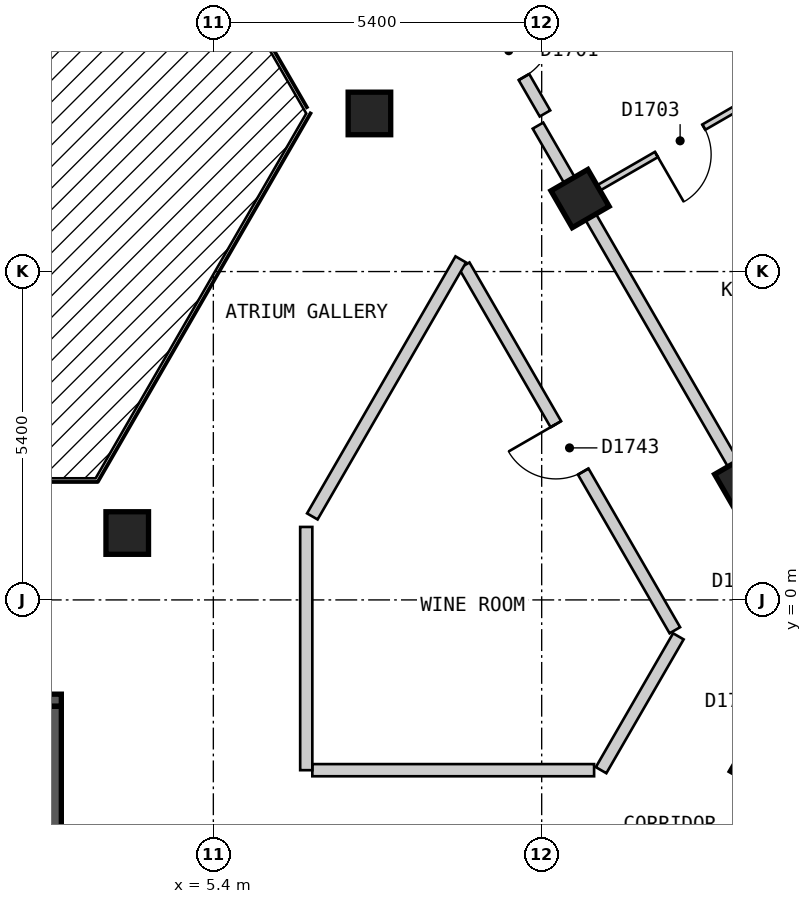
"""IFC4 building model, lengths in metres.
Left out: names, types, materials, properties, quantities, classifications, styles, units other than length and angle.
Written with IfcOpenShell. Run it as: python <this file> out.ifc"""

import sys

from ifc_helpers import new_model, si_unit, direction, frame, frame_2d, origin, origin_2d, place, context, subcontext, project, spatial, rectangle, extrude, element, fill, save


model = new_model("IFC4")
c1 = context("Model", 3, precision=1e-05, world=origin(), true_north=direction((0.0, 1.0)))
c2 = subcontext(c1, "Body", "Model", "MODEL_VIEW")
j1 = project(units=[si_unit("LENGTHUNIT", "METRE"), si_unit("PLANEANGLEUNIT", "RADIAN")], contexts=[c1])
p1 = place(None, origin())
s1 = spatial("IfcSite", under=j1, at=p1, CompositionType="ELEMENT")
p2 = place(p1, origin())
s2 = spatial("IfcBuilding", under=s1, at=p2, CompositionType="ELEMENT")
p3 = place(p2, frame((0.0, 0.0, 181.2)))
s3 = spatial("IfcBuildingStorey", under=s2, at=p3, CompositionType="ELEMENT", Elevation=181.2)
for number, where, z_axis, x_axis in (
    (1, (14.382, -2.689, 0.0), (0.0, 0.0, 1.0), (0.5, 0.866, 0.0)),
    (2, (14.123, 1.937, 0.0), (0.0, 0.0, 1.0), (-0.5, 0.866, 0.0)),
    (3, (3.984, 1.1, 0.0), (0.0, 0.0, 1.0), (1.0, 0.0, 0.0)),
    (4, (11.431, 6.6, 0.0), (0.0, 0.0, 1.0), (-0.5, 0.866, 0.0)),
    (5, (7.967, 8.0, 0.0), (0.0, 0.0, 1.0), (1.0, 0.0, 0.0)),
):
    element("IfcColumn", number, at=place(p3, frame(where, z_axis=z_axis, x_axis=x_axis)), inside=s3, PredefinedType="COLUMN", context=c2, shape_type="SweptSolid", body=[
        extrude(rectangle(XDim=0.7, YDim=0.7, at=origin_2d()), origin(), (0.0, 0.0, 1.0), 3.0),
    ])
p4 = place(p3, frame((-2.9, -1.65, 0.0), z_axis=(0.0, 0.0, 1.0), x_axis=(1.0, 0.0, 0.0)))
e6 = element("IfcWall", 6, at=p4, inside=s3, PredefinedType="SOLIDWALL", context=c2, shape_type="SweptSolid", body=[
    extrude(rectangle(XDim=5.8, YDim=0.2, at=frame_2d((2.9, 0.0))), origin(), (0.0, 0.0, 1.0), 2.7),
])
p5 = place(p4, frame((0.3, 0.0, 0.0)))
e7 = element("IfcOpeningElement", 7, at=p5, cuts=e6, PredefinedType="OPENING", context=c2, shape_type="SweptSolid", body=[
    extrude(rectangle(XDim=1.2, YDim=2.1, at=frame_2d((0.6, 1.05))), frame((0.0, 0.11, 0.0), z_axis=(0.0, -1.0, 0.0), x_axis=(1.0, 0.0, 0.0)), (0.0, 0.0, 1.0), 0.22),
])
p6 = place(p3, frame((2.8, -4.5, 0.0), z_axis=(0.0, 0.0, 1.0), x_axis=(0.0, 1.0, 0.0)))
e8 = element("IfcWall", 8, at=p6, inside=s3, PredefinedType="SOLIDWALL", context=c2, shape_type="SweptSolid", body=[
    extrude(rectangle(XDim=2.75, YDim=0.2, at=frame_2d((1.375, 0.0))), origin(), (0.0, 0.0, 1.0), 2.7),
])
p7 = place(p3, frame((9.526, 5.5, 0.0), z_axis=(0.0, 0.0, 1.0), x_axis=(0.500062092869, -0.865989551482, 0.0)))
e9 = element("IfcWall", 9, at=p7, inside=s3, PredefinedType="PARTITIONING", context=c2, shape_type="SweptSolid", body=[
    extrude(rectangle(XDim=6.927, YDim=0.2, at=frame_2d((3.464, 0.0))), origin(), (0.0, 0.0, 1.0), 2.7),
])
p8 = place(p7, frame((3.014, 0.0, 0.0)))
e10 = element("IfcOpeningElement", 10, at=p8, cuts=e9, PredefinedType="OPENING", context=c2, shape_type="SweptSolid", body=[
    extrude(rectangle(XDim=0.9, YDim=2.1, at=frame_2d((0.45, 1.05))), frame((0.0, 0.11, 0.0), z_axis=(0.0, -1.0, 0.0), x_axis=(1.0, 0.0, 0.0)), (0.0, 0.0, 1.0), 0.22),
])
p9 = place(p3, frame((10.739, 7.8, 0.0), z_axis=(0.0, 0.0, 1.0), x_axis=(0.500023726918, -0.866011704609, 0.0)))
e11 = element("IfcWall", 11, at=p9, inside=s3, PredefinedType="PARTITIONING", context=c2, shape_type="SweptSolid", body=[
    extrude(rectangle(XDim=9.47, YDim=0.2, at=frame_2d((4.735, 0.0))), origin(), (0.0, 0.0, 1.0), 2.7),
])
p10 = place(p9, frame((8.168, 0.0, 0.0)))
e12 = element("IfcOpeningElement", 12, at=p10, cuts=e11, PredefinedType="OPENING", context=c2, shape_type="SweptSolid", body=[
    extrude(rectangle(XDim=1.0, YDim=2.1, at=frame_2d((0.5, 1.05))), frame((0.0, 0.11, 0.0), z_axis=(0.0, -1.0, 0.0), x_axis=(1.0, 0.0, 0.0)), (0.0, 0.0, 1.0), 0.22),
])
p11 = place(p3, frame((5.485, 17.3, 0.0), z_axis=(0.0, 0.0, 1.0), x_axis=(0.499965832213, -0.866045129667, 0.0)))
e13 = element("IfcWall", 13, at=p11, inside=s3, PredefinedType="PARTITIONING", context=c2, shape_type="SweptSolid", body=[
    extrude(rectangle(XDim=10.739, YDim=0.2, at=frame_2d((5.369, 0.0))), origin(), (0.0, 0.0, 1.0), 2.7),
])
p12 = place(p11, frame((9.047, 0.0, 0.0)))
e14 = element("IfcOpeningElement", 14, at=p12, cuts=e13, PredefinedType="OPENING", context=c2, shape_type="SweptSolid", body=[
    extrude(rectangle(XDim=1.0, YDim=2.1, at=frame_2d((0.5, 1.05))), frame((0.0, 0.11, 0.0), z_axis=(0.0, -1.0, 0.0), x_axis=(1.0, 0.0, 0.0)), (0.0, 0.0, 1.0), 0.22),
])
p13 = place(p3, frame((7.028, -2.8, 0.0), z_axis=(0.0, 0.0, 1.0), x_axis=(1.0, 0.0, 0.0)))
e15 = element("IfcWall", 15, at=p13, inside=s3, PredefinedType="PARTITIONING", context=c2, shape_type="SweptSolid", body=[
    extrude(rectangle(XDim=4.634, YDim=0.2, at=frame_2d((2.317, 0.0))), origin(), (0.0, 0.0, 1.0), 2.7),
])
p14 = place(p3, frame((7.028, 1.373, 0.0), z_axis=(0.0, 0.0, 1.0), x_axis=(0.500065924398, 0.86598733897, 0.0)))
e16 = element("IfcWall", 16, at=p14, inside=s3, PredefinedType="PARTITIONING", context=c2, shape_type="SweptSolid", body=[
    extrude(rectangle(XDim=4.881, YDim=0.2, at=frame_2d((2.44, 0.0))), origin(), (0.0, 0.0, 1.0), 2.7),
])
p15 = place(p3, frame((11.777, -2.8, 0.0), z_axis=(0.0, 0.0, 1.0), x_axis=(0.500085537782, 0.86597601289, 0.0)))
e17 = element("IfcWall", 17, at=p15, inside=s3, PredefinedType="PARTITIONING", context=c2, shape_type="SweptSolid", body=[
    extrude(rectangle(XDim=2.542, YDim=0.2, at=frame_2d((1.271, 0.0))), origin(), (0.0, 0.0, 1.0), 2.7),
])
p16 = place(p3, frame((6.928, -2.8, 0.0), z_axis=(0.0, 0.0, 1.0), x_axis=(0.0, 1.0, 0.0)))
e18 = element("IfcWall", 18, at=p16, inside=s3, PredefinedType="PARTITIONING", context=c2, shape_type="SweptSolid", body=[
    extrude(rectangle(XDim=4.0, YDim=0.2, at=frame_2d((2.0, 0.0))), origin(), (0.0, 0.0, 1.0), 2.7),
])
p17 = place(p3, frame((9.526, 17.5, 0.0), z_axis=(0.0, 0.0, 1.0), x_axis=(0.500019134094, -0.866014356428, 0.0)))
e19 = element("IfcWall", 19, at=p17, inside=s3, PredefinedType="PARTITIONING", context=c2, shape_type="SweptSolid", body=[
    extrude(rectangle(XDim=10.97, YDim=0.1, at=frame_2d((5.485, 0.0))), origin(), (0.0, 0.0, 1.0), 2.7),
])
p18 = place(p17, frame((7.25, 0.0, 0.0)))
e20 = element("IfcOpeningElement", 20, at=p18, cuts=e19, PredefinedType="OPENING", context=c2, shape_type="SweptSolid", body=[
    extrude(rectangle(XDim=0.9, YDim=2.1, at=frame_2d((0.45, 1.05))), frame((0.0, 0.06, 0.0), z_axis=(0.0, -1.0, 0.0), x_axis=(1.0, 0.0, 0.0)), (0.0, 0.0, 1.0), 0.12),
])
p19 = place(p3, frame((11.518, 6.65, 0.0), z_axis=(0.0, 0.0, 1.0), x_axis=(0.865984470368, 0.500070892056, 0.0)))
e21 = element("IfcWall", 21, at=p19, inside=s3, PredefinedType="PARTITIONING", context=c2, shape_type="SweptSolid", body=[
    extrude(rectangle(XDim=3.7, YDim=0.1, at=frame_2d((1.85, 0.0))), origin(), (0.0, 0.0, 1.0), 2.7),
])
p20 = place(p19, frame((1.35, 0.0, 0.0)))
e22 = element("IfcOpeningElement", 22, at=p20, cuts=e21, PredefinedType="OPENING", context=c2, shape_type="SweptSolid", body=[
    extrude(rectangle(XDim=0.9, YDim=2.1, at=frame_2d((0.45, 1.05))), frame((0.0, 0.06, 0.0), z_axis=(0.0, -1.0, 0.0), x_axis=(1.0, 0.0, 0.0)), (0.0, 0.0, 1.0), 0.12),
])
p21 = place(p12, origin())
e23 = element("IfcDoor", 23, at=p21, inside=s3, OperationType="SINGLE_SWING_LEFT", PredefinedType="DOOR", context=c2, shape_type="SweptSolid", body=[
    extrude(rectangle(XDim=1.0, YDim=2.1, at=frame_2d((0.5, 1.05))), frame((0.0, 0.025, 0.0), z_axis=(0.0, -1.0, 0.0), x_axis=(1.0, 0.0, 0.0)), (0.0, 0.0, 1.0), 0.05),
])
fill(e14, e23)
p22 = place(p20, origin())
e24 = element("IfcDoor", 24, at=p22, inside=s3, OperationType="SINGLE_SWING_LEFT", PredefinedType="DOOR", context=c2, shape_type="SweptSolid", body=[
    extrude(rectangle(XDim=0.9, YDim=2.1, at=frame_2d((0.45, 1.05))), frame((0.0, 0.025, 0.0), z_axis=(0.0, -1.0, 0.0), x_axis=(1.0, 0.0, 0.0)), (0.0, 0.0, 1.0), 0.05),
])
fill(e22, e24)
p23 = place(p8, origin())
e25 = element("IfcDoor", 25, at=p23, inside=s3, OperationType="SINGLE_SWING_LEFT", PredefinedType="DOOR", context=c2, shape_type="SweptSolid", body=[
    extrude(rectangle(XDim=0.9, YDim=2.1, at=frame_2d((0.45, 1.05))), frame((0.0, 0.025, 0.0), z_axis=(0.0, -1.0, 0.0), x_axis=(1.0, 0.0, 0.0)), (0.0, 0.0, 1.0), 0.05),
])
fill(e10, e25)
save(model, sys.argv[1])
